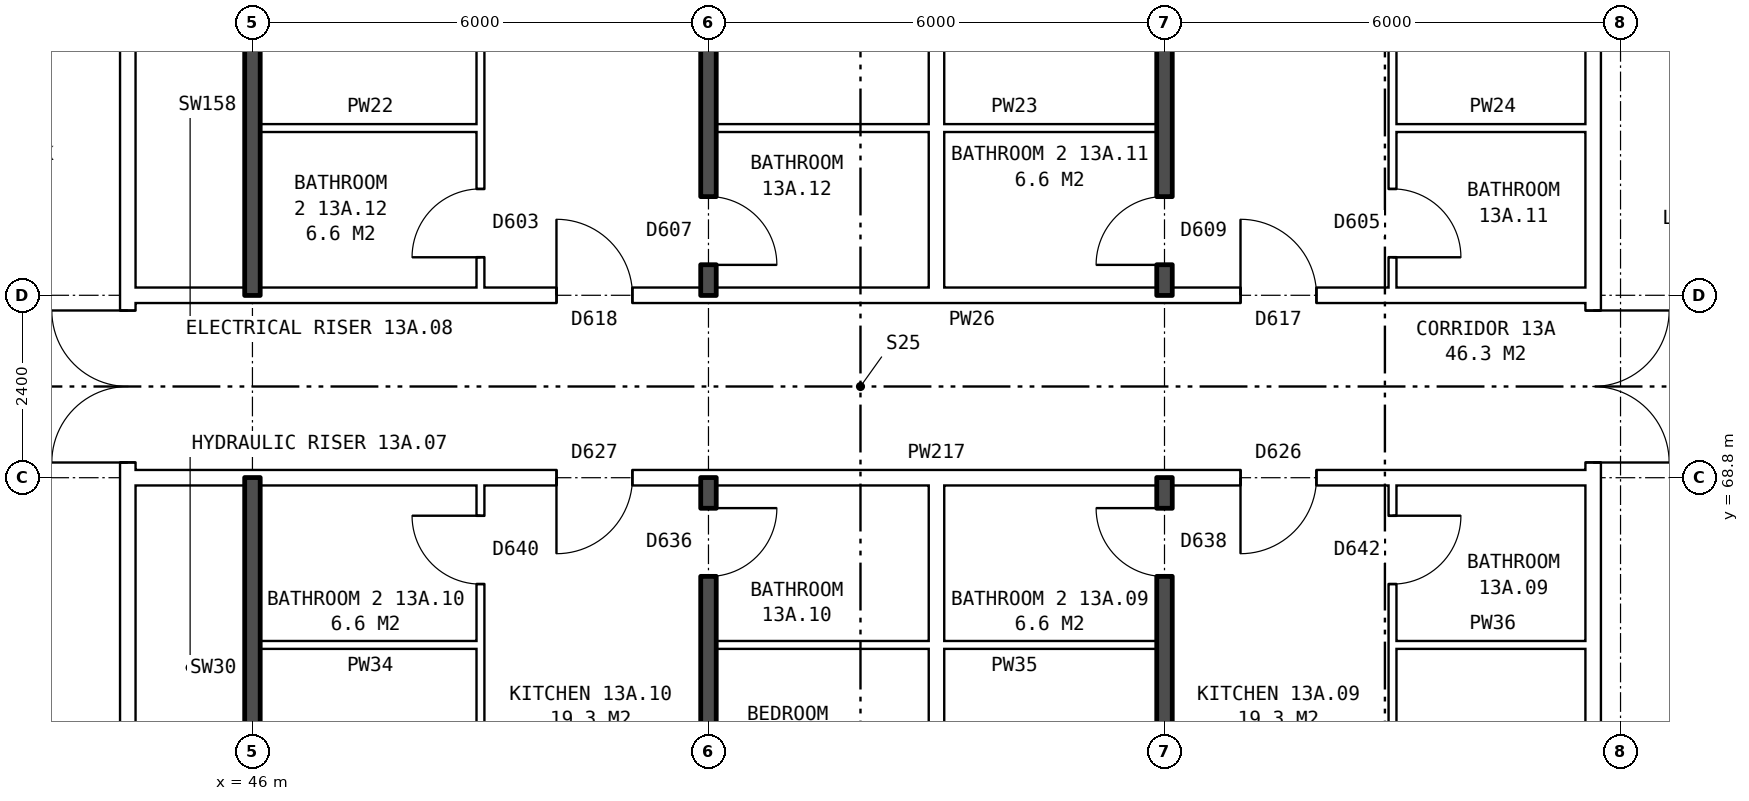
"""IFC4 building model, lengths in metres.
Left out: names, types, materials, properties, quantities, classifications, styles, units other than length and angle.
Written with IfcOpenShell. Run it as: python <this file> out.ifc"""

import sys

from ifc_helpers import new_model, si_unit, direction, frame, frame_2d, origin, place, context, subcontext, project, spatial, rectangle, extrude, element, fill, save


model = new_model("IFC4")
c1 = context("Model", 3, precision=1e-05, world=origin(), true_north=direction((0.0, 1.0)))
c2 = subcontext(c1, "Body", "Model", "MODEL_VIEW")
j1 = project(units=[si_unit("LENGTHUNIT", "METRE"), si_unit("PLANEANGLEUNIT", "RADIAN")], contexts=[c1])
p1 = place(None, origin())
s1 = spatial("IfcSite", under=j1, at=p1, CompositionType="ELEMENT")
p2 = place(p1, origin())
s2 = spatial("IfcBuilding", under=s1, at=p2, CompositionType="ELEMENT")
p3 = place(p2, frame((0.0, 0.0, 50.5)))
s3 = spatial("IfcBuildingStorey", under=s2, at=p3, CompositionType="ELEMENT", Elevation=50.5)
p4 = place(p3, frame((63.64, 63.9, 0.0), z_axis=(0.0, 0.0, 1.0), x_axis=(0.0, 1.0, 0.0)))
e1 = element("IfcWall", 1, at=p4, inside=s3, PredefinedType="PARTITIONING", context=c2, shape_type="SweptSolid", body=[
    extrude(rectangle(XDim=12.2, YDim=0.2, at=frame_2d((6.1, 0.0))), origin(), (0.0, 0.0, 1.0), 2.85),
])
p5 = place(p4, frame((5.1, 0.0, 0.0)))
e2 = element("IfcOpeningElement", 2, at=p5, cuts=e1, PredefinedType="OPENING", context=c2, shape_type="SweptSolid", body=[
    extrude(rectangle(XDim=2.0, YDim=2.1, at=frame_2d((1.0, 1.05))), frame((0.0, 0.11, 0.0), z_axis=(0.0, -1.0, 0.0), x_axis=(1.0, 0.0, 0.0)), (0.0, 0.0, 1.0), 0.22),
])
p6 = place(p3, frame((44.36, 63.9, 0.0), z_axis=(0.0, 0.0, 1.0), x_axis=(0.0, 1.0, 0.0)))
e3 = element("IfcWall", 3, at=p6, inside=s3, PredefinedType="PARTITIONING", context=c2, shape_type="SweptSolid", body=[
    extrude(rectangle(XDim=12.2, YDim=0.2, at=frame_2d((6.1, 0.0))), origin(), (0.0, 0.0, 1.0), 2.85),
])
p7 = place(p6, frame((5.1, 0.0, 0.0)))
e4 = element("IfcOpeningElement", 4, at=p7, cuts=e3, PredefinedType="OPENING", context=c2, shape_type="SweptSolid", body=[
    extrude(rectangle(XDim=2.0, YDim=2.1, at=frame_2d((1.0, 1.05))), frame((0.0, 0.11, 0.0), z_axis=(0.0, -1.0, 0.0), x_axis=(1.0, 0.0, 0.0)), (0.0, 0.0, 1.0), 0.22),
])
p8 = place(p3, frame((46.1, 66.6, 0.0), z_axis=(0.0, 0.0, 1.0), x_axis=(1.0, 0.0, 0.0)))
e5 = element("IfcWall", 5, at=p8, inside=s3, PredefinedType="PARTITIONING", context=c2, shape_type="SweptSolid", body=[
    extrude(rectangle(XDim=2.9, YDim=0.1, at=frame_2d((1.45, 0.0))), origin(), (0.0, 0.0, 1.0), 2.85),
])
p9 = place(p3, frame((52.1, 66.6, 0.0), z_axis=(0.0, 0.0, 1.0), x_axis=(1.0, 0.0, 0.0)))
e6 = element("IfcWall", 6, at=p9, inside=s3, PredefinedType="PARTITIONING", context=c2, shape_type="SweptSolid", body=[
    extrude(rectangle(XDim=5.8, YDim=0.1, at=frame_2d((2.9, 0.0))), origin(), (0.0, 0.0, 1.0), 2.85),
])
p10 = place(p3, frame((61.0, 66.6, 0.0), z_axis=(0.0, 0.0, 1.0), x_axis=(1.0, 0.0, 0.0)))
e7 = element("IfcWall", 7, at=p10, inside=s3, PredefinedType="PARTITIONING", context=c2, shape_type="SweptSolid", body=[
    extrude(rectangle(XDim=2.64, YDim=0.1, at=frame_2d((1.32, 0.0))), origin(), (0.0, 0.0, 1.0), 2.85),
])
p11 = place(p3, frame((44.36, 68.8, 0.0), z_axis=(0.0, 0.0, 1.0), x_axis=(1.0, 0.0, 0.0)))
e8 = element("IfcWall", 8, at=p11, inside=s3, PredefinedType="PARTITIONING", context=c2, shape_type="SweptSolid", body=[
    extrude(rectangle(XDim=19.28, YDim=0.2, at=frame_2d((9.64, 0.0))), origin(), (0.0, 0.0, 1.0), 2.85),
])
p12 = place(p11, frame((14.64, 0.0, 0.0)))
e9 = element("IfcOpeningElement", 9, at=p12, cuts=e8, PredefinedType="OPENING", context=c2, shape_type="SweptSolid", body=[
    extrude(rectangle(XDim=1.0, YDim=2.1, at=frame_2d((0.5, 1.05))), frame((0.0, 0.11, 0.0), z_axis=(0.0, -1.0, 0.0), x_axis=(1.0, 0.0, 0.0)), (0.0, 0.0, 1.0), 0.22),
])
p13 = place(p11, frame((5.64, 0.0, 0.0)))
e10 = element("IfcOpeningElement", 10, at=p13, cuts=e8, PredefinedType="OPENING", context=c2, shape_type="SweptSolid", body=[
    extrude(rectangle(XDim=1.0, YDim=2.1, at=frame_2d((0.5, 1.05))), frame((0.0, 0.11, 0.0), z_axis=(0.0, -1.0, 0.0), x_axis=(1.0, 0.0, 0.0)), (0.0, 0.0, 1.0), 0.22),
])
p14 = place(p3, frame((44.36, 71.2, 0.0), z_axis=(0.0, 0.0, 1.0), x_axis=(1.0, 0.0, 0.0)))
e11 = element("IfcWall", 11, at=p14, inside=s3, PredefinedType="PARTITIONING", context=c2, shape_type="SweptSolid", body=[
    extrude(rectangle(XDim=19.28, YDim=0.2, at=frame_2d((9.64, 0.0))), origin(), (0.0, 0.0, 1.0), 2.85),
])
p15 = place(p14, frame((14.64, 0.0, 0.0)))
e12 = element("IfcOpeningElement", 12, at=p15, cuts=e11, PredefinedType="OPENING", context=c2, shape_type="SweptSolid", body=[
    extrude(rectangle(XDim=1.0, YDim=2.1, at=frame_2d((0.5, 1.05))), frame((0.0, 0.11, 0.0), z_axis=(0.0, -1.0, 0.0), x_axis=(1.0, 0.0, 0.0)), (0.0, 0.0, 1.0), 0.22),
])
p16 = place(p14, frame((5.64, 0.0, 0.0)))
e13 = element("IfcOpeningElement", 13, at=p16, cuts=e11, PredefinedType="OPENING", context=c2, shape_type="SweptSolid", body=[
    extrude(rectangle(XDim=1.0, YDim=2.1, at=frame_2d((0.5, 1.05))), frame((0.0, 0.11, 0.0), z_axis=(0.0, -1.0, 0.0), x_axis=(1.0, 0.0, 0.0)), (0.0, 0.0, 1.0), 0.22),
])
p17 = place(p3, frame((46.1, 73.4, 0.0), z_axis=(0.0, 0.0, 1.0), x_axis=(1.0, 0.0, 0.0)))
e14 = element("IfcWall", 14, at=p17, inside=s3, PredefinedType="PARTITIONING", context=c2, shape_type="SweptSolid", body=[
    extrude(rectangle(XDim=2.9, YDim=0.1, at=frame_2d((1.45, 0.0))), origin(), (0.0, 0.0, 1.0), 2.85),
])
p18 = place(p3, frame((52.1, 73.4, 0.0), z_axis=(0.0, 0.0, 1.0), x_axis=(1.0, 0.0, 0.0)))
e15 = element("IfcWall", 15, at=p18, inside=s3, PredefinedType="PARTITIONING", context=c2, shape_type="SweptSolid", body=[
    extrude(rectangle(XDim=5.8, YDim=0.1, at=frame_2d((2.9, 0.0))), origin(), (0.0, 0.0, 1.0), 2.85),
])
p19 = place(p3, frame((61.0, 73.4, 0.0), z_axis=(0.0, 0.0, 1.0), x_axis=(1.0, 0.0, 0.0)))
e16 = element("IfcWall", 16, at=p19, inside=s3, PredefinedType="PARTITIONING", context=c2, shape_type="SweptSolid", body=[
    extrude(rectangle(XDim=2.64, YDim=0.1, at=frame_2d((1.32, 0.0))), origin(), (0.0, 0.0, 1.0), 2.85),
])
for number, where, z_axis, x_axis in (
    (17, (46.0, 63.8, 0.0), (0.0, 0.0, 1.0), (0.0, 1.0, 0.0)),
    (18, (46.0, 71.2, 0.0), (0.0, 0.0, 1.0), (0.0, 1.0, 0.0)),
):
    element("IfcWall", number, at=place(p3, frame(where, z_axis=z_axis, x_axis=x_axis)), inside=s3, PredefinedType="SOLIDWALL", context=c2, shape_type="SweptSolid", body=[
        extrude(rectangle(XDim=5.0, YDim=0.2, at=frame_2d((2.5, 0.0))), origin(), (0.0, 0.0, 1.0), 2.85),
    ])
p20 = place(p3, frame((49.0, 54.36, 0.0), z_axis=(0.0, 0.0, 1.0), x_axis=(0.0, 1.0, 0.0)))
e19 = element("IfcWall", 19, at=p20, inside=s3, PredefinedType="PARTITIONING", context=c2, shape_type="SweptSolid", body=[
    extrude(rectangle(XDim=14.34, YDim=0.1, at=frame_2d((7.17, 0.0))), origin(), (0.0, 0.0, 1.0), 2.85),
])
p21 = place(p20, frame((6.7, 0.0, 0.0)))
e20 = element("IfcOpeningElement", 20, at=p21, cuts=e19, PredefinedType="OPENING", context=c2, shape_type="SweptSolid", body=[
    extrude(rectangle(XDim=0.9, YDim=2.1, at=frame_2d((0.45, 1.05))), frame((0.0, 0.06, 0.0), z_axis=(0.0, -1.0, 0.0), x_axis=(1.0, 0.0, 0.0)), (0.0, 0.0, 1.0), 0.12),
])
p22 = place(p20, frame((13.04, 0.0, 0.0)))
e21 = element("IfcOpeningElement", 21, at=p22, cuts=e19, PredefinedType="OPENING", context=c2, shape_type="SweptSolid", body=[
    extrude(rectangle(XDim=0.9, YDim=2.1, at=frame_2d((0.45, 1.05))), frame((0.0, 0.06, 0.0), z_axis=(0.0, -1.0, 0.0), x_axis=(1.0, 0.0, 0.0)), (0.0, 0.0, 1.0), 0.12),
])
p23 = place(p3, frame((49.0, 71.3, 0.0), z_axis=(0.0, 0.0, 1.0), x_axis=(0.0, 1.0, 0.0)))
e22 = element("IfcWall", 22, at=p23, inside=s3, PredefinedType="PARTITIONING", context=c2, shape_type="SweptSolid", body=[
    extrude(rectangle(XDim=14.34, YDim=0.1, at=frame_2d((7.17, 0.0))), origin(), (0.0, 0.0, 1.0), 2.85),
])
p24 = place(p23, frame((6.74, 0.0, 0.0)))
e23 = element("IfcOpeningElement", 23, at=p24, cuts=e22, PredefinedType="OPENING", context=c2, shape_type="SweptSolid", body=[
    extrude(rectangle(XDim=0.9, YDim=2.1, at=frame_2d((0.45, 1.05))), frame((0.0, 0.06, 0.0), z_axis=(0.0, -1.0, 0.0), x_axis=(1.0, 0.0, 0.0)), (0.0, 0.0, 1.0), 0.12),
])
p25 = place(p23, frame((0.4, 0.0, 0.0)))
e24 = element("IfcOpeningElement", 24, at=p25, cuts=e22, PredefinedType="OPENING", context=c2, shape_type="SweptSolid", body=[
    extrude(rectangle(XDim=0.9, YDim=2.1, at=frame_2d((0.45, 1.05))), frame((0.0, 0.06, 0.0), z_axis=(0.0, -1.0, 0.0), x_axis=(1.0, 0.0, 0.0)), (0.0, 0.0, 1.0), 0.12),
])
p26 = place(p3, frame((52.0, 54.36, 0.0), z_axis=(0.0, 0.0, 1.0), x_axis=(0.0, 1.0, 0.0)))
e25 = element("IfcWall", 25, at=p26, inside=s3, PredefinedType="SOLIDWALL", context=c2, shape_type="SweptSolid", body=[
    extrude(rectangle(XDim=14.44, YDim=0.2, at=frame_2d((7.22, 0.0))), origin(), (0.0, 0.0, 1.0), 2.85),
])
p27 = place(p26, frame((6.7, 0.0, 0.0)))
e26 = element("IfcOpeningElement", 26, at=p27, cuts=e25, PredefinedType="OPENING", context=c2, shape_type="SweptSolid", body=[
    extrude(rectangle(XDim=0.9, YDim=2.1, at=frame_2d((0.45, 1.05))), frame((0.0, 0.11, 0.0), z_axis=(0.0, -1.0, 0.0), x_axis=(1.0, 0.0, 0.0)), (0.0, 0.0, 1.0), 0.22),
])
p28 = place(p26, frame((13.14, 0.0, 0.0)))
e27 = element("IfcOpeningElement", 27, at=p28, cuts=e25, PredefinedType="OPENING", context=c2, shape_type="SweptSolid", body=[
    extrude(rectangle(XDim=0.9, YDim=2.1, at=frame_2d((0.45, 1.05))), frame((0.0, 0.11, 0.0), z_axis=(0.0, -1.0, 0.0), x_axis=(1.0, 0.0, 0.0)), (0.0, 0.0, 1.0), 0.22),
])
p29 = place(p3, frame((52.0, 71.2, 0.0), z_axis=(0.0, 0.0, 1.0), x_axis=(0.0, 1.0, 0.0)))
e28 = element("IfcWall", 28, at=p29, inside=s3, PredefinedType="SOLIDWALL", context=c2, shape_type="SweptSolid", body=[
    extrude(rectangle(XDim=14.44, YDim=0.2, at=frame_2d((7.22, 0.0))), origin(), (0.0, 0.0, 1.0), 2.85),
])
p30 = place(p29, frame((6.84, 0.0, 0.0)))
e29 = element("IfcOpeningElement", 29, at=p30, cuts=e28, PredefinedType="OPENING", context=c2, shape_type="SweptSolid", body=[
    extrude(rectangle(XDim=0.9, YDim=2.1, at=frame_2d((0.45, 1.05))), frame((0.0, 0.11, 0.0), z_axis=(0.0, -1.0, 0.0), x_axis=(1.0, 0.0, 0.0)), (0.0, 0.0, 1.0), 0.22),
])
p31 = place(p29, frame((0.4, 0.0, 0.0)))
e30 = element("IfcOpeningElement", 30, at=p31, cuts=e28, PredefinedType="OPENING", context=c2, shape_type="SweptSolid", body=[
    extrude(rectangle(XDim=0.9, YDim=2.1, at=frame_2d((0.45, 1.05))), frame((0.0, 0.11, 0.0), z_axis=(0.0, -1.0, 0.0), x_axis=(1.0, 0.0, 0.0)), (0.0, 0.0, 1.0), 0.22),
])
for number, where, z_axis, x_axis in (
    (31, (55.0, 54.36, 0.0), (0.0, 0.0, 1.0), (0.0, 1.0, 0.0)),
    (32, (55.0, 71.3, 0.0), (0.0, 0.0, 1.0), (0.0, 1.0, 0.0)),
):
    element("IfcWall", number, at=place(p3, frame(where, z_axis=z_axis, x_axis=x_axis)), inside=s3, PredefinedType="PARTITIONING", context=c2, shape_type="SweptSolid", body=[
        extrude(rectangle(XDim=14.34, YDim=0.2, at=frame_2d((7.17, 0.0))), origin(), (0.0, 0.0, 1.0), 2.85),
    ])
p32 = place(p3, frame((58.0, 54.36, 0.0), z_axis=(0.0, 0.0, 1.0), x_axis=(0.0, 1.0, 0.0)))
e33 = element("IfcWall", 33, at=p32, inside=s3, PredefinedType="SOLIDWALL", context=c2, shape_type="SweptSolid", body=[
    extrude(rectangle(XDim=14.44, YDim=0.2, at=frame_2d((7.22, 0.0))), origin(), (0.0, 0.0, 1.0), 2.85),
])
p33 = place(p32, frame((6.7, 0.0, 0.0)))
e34 = element("IfcOpeningElement", 34, at=p33, cuts=e33, PredefinedType="OPENING", context=c2, shape_type="SweptSolid", body=[
    extrude(rectangle(XDim=0.9, YDim=2.1, at=frame_2d((0.45, 1.05))), frame((0.0, 0.11, 0.0), z_axis=(0.0, -1.0, 0.0), x_axis=(1.0, 0.0, 0.0)), (0.0, 0.0, 1.0), 0.22),
])
p34 = place(p32, frame((13.14, 0.0, 0.0)))
e35 = element("IfcOpeningElement", 35, at=p34, cuts=e33, PredefinedType="OPENING", context=c2, shape_type="SweptSolid", body=[
    extrude(rectangle(XDim=0.9, YDim=2.1, at=frame_2d((0.45, 1.05))), frame((0.0, 0.11, 0.0), z_axis=(0.0, -1.0, 0.0), x_axis=(1.0, 0.0, 0.0)), (0.0, 0.0, 1.0), 0.22),
])
p35 = place(p3, frame((58.0, 71.2, 0.0), z_axis=(0.0, 0.0, 1.0), x_axis=(0.0, 1.0, 0.0)))
e36 = element("IfcWall", 36, at=p35, inside=s3, PredefinedType="SOLIDWALL", context=c2, shape_type="SweptSolid", body=[
    extrude(rectangle(XDim=14.44, YDim=0.2, at=frame_2d((7.22, 0.0))), origin(), (0.0, 0.0, 1.0), 2.85),
])
p36 = place(p35, frame((8.04, 0.0, 0.0)))
e37 = element("IfcOpeningElement", 37, at=p36, cuts=e36, PredefinedType="OPENING", context=c2, shape_type="SweptSolid", body=[
    extrude(rectangle(XDim=0.9, YDim=2.1, at=frame_2d((0.45, 1.05))), frame((0.0, 0.11, 0.0), z_axis=(0.0, -1.0, 0.0), x_axis=(1.0, 0.0, 0.0)), (0.0, 0.0, 1.0), 0.22),
])
p37 = place(p35, frame((0.4, 0.0, 0.0)))
e38 = element("IfcOpeningElement", 38, at=p37, cuts=e36, PredefinedType="OPENING", context=c2, shape_type="SweptSolid", body=[
    extrude(rectangle(XDim=0.9, YDim=2.1, at=frame_2d((0.45, 1.05))), frame((0.0, 0.11, 0.0), z_axis=(0.0, -1.0, 0.0), x_axis=(1.0, 0.0, 0.0)), (0.0, 0.0, 1.0), 0.22),
])
p38 = place(p3, frame((61.0, 54.36, 0.0), z_axis=(0.0, 0.0, 1.0), x_axis=(0.0, 1.0, 0.0)))
e39 = element("IfcWall", 39, at=p38, inside=s3, PredefinedType="PARTITIONING", context=c2, shape_type="SweptSolid", body=[
    extrude(rectangle(XDim=14.34, YDim=0.1, at=frame_2d((7.17, 0.0))), origin(), (0.0, 0.0, 1.0), 2.85),
])
p39 = place(p38, frame((6.7, 0.0, 0.0)))
e40 = element("IfcOpeningElement", 40, at=p39, cuts=e39, PredefinedType="OPENING", context=c2, shape_type="SweptSolid", body=[
    extrude(rectangle(XDim=0.9, YDim=2.1, at=frame_2d((0.45, 1.05))), frame((0.0, 0.06, 0.0), z_axis=(0.0, -1.0, 0.0), x_axis=(1.0, 0.0, 0.0)), (0.0, 0.0, 1.0), 0.12),
])
p40 = place(p38, frame((13.04, 0.0, 0.0)))
e41 = element("IfcOpeningElement", 41, at=p40, cuts=e39, PredefinedType="OPENING", context=c2, shape_type="SweptSolid", body=[
    extrude(rectangle(XDim=0.9, YDim=2.1, at=frame_2d((0.45, 1.05))), frame((0.0, 0.06, 0.0), z_axis=(0.0, -1.0, 0.0), x_axis=(1.0, 0.0, 0.0)), (0.0, 0.0, 1.0), 0.12),
])
p41 = place(p3, frame((61.0, 71.3, 0.0), z_axis=(0.0, 0.0, 1.0), x_axis=(0.0, 1.0, 0.0)))
e42 = element("IfcWall", 42, at=p41, inside=s3, PredefinedType="PARTITIONING", context=c2, shape_type="SweptSolid", body=[
    extrude(rectangle(XDim=14.34, YDim=0.1, at=frame_2d((7.17, 0.0))), origin(), (0.0, 0.0, 1.0), 2.85),
])
p42 = place(p41, frame((7.94, 0.0, 0.0)))
e43 = element("IfcOpeningElement", 43, at=p42, cuts=e42, PredefinedType="OPENING", context=c2, shape_type="SweptSolid", body=[
    extrude(rectangle(XDim=0.9, YDim=2.1, at=frame_2d((0.45, 1.05))), frame((0.0, 0.06, 0.0), z_axis=(0.0, -1.0, 0.0), x_axis=(1.0, 0.0, 0.0)), (0.0, 0.0, 1.0), 0.12),
])
p43 = place(p41, frame((0.4, 0.0, 0.0)))
e44 = element("IfcOpeningElement", 44, at=p43, cuts=e42, PredefinedType="OPENING", context=c2, shape_type="SweptSolid", body=[
    extrude(rectangle(XDim=0.9, YDim=2.1, at=frame_2d((0.45, 1.05))), frame((0.0, 0.06, 0.0), z_axis=(0.0, -1.0, 0.0), x_axis=(1.0, 0.0, 0.0)), (0.0, 0.0, 1.0), 0.12),
])
p44 = place(p5, frame((2.0, 0.0, 0.0), z_axis=(0.0, 0.0, 1.0), x_axis=(-1.0, 0.0, 0.0)))
e45 = element("IfcDoor", 45, at=p44, inside=s3, OperationType="DOUBLE_DOOR_SINGLE_SWING", PredefinedType="DOOR", context=c2, shape_type="SweptSolid", body=[
    extrude(rectangle(XDim=2.0, YDim=2.1, at=frame_2d((1.0, 1.05))), frame((0.0, 0.025, 0.0), z_axis=(0.0, -1.0, 0.0), x_axis=(1.0, 0.0, 0.0)), (0.0, 0.0, 1.0), 0.05),
])
fill(e2, e45)
p45 = place(p7, origin())
e46 = element("IfcDoor", 46, at=p45, inside=s3, OperationType="DOUBLE_DOOR_SINGLE_SWING", PredefinedType="DOOR", context=c2, shape_type="SweptSolid", body=[
    extrude(rectangle(XDim=2.0, YDim=2.1, at=frame_2d((1.0, 1.05))), frame((0.0, 0.025, 0.0), z_axis=(0.0, -1.0, 0.0), x_axis=(1.0, 0.0, 0.0)), (0.0, 0.0, 1.0), 0.05),
])
fill(e4, e46)
p46 = place(p12, frame((1.0, 0.0, 0.0), z_axis=(0.0, 0.0, 1.0), x_axis=(-1.0, 0.0, 0.0)))
e47 = element("IfcDoor", 47, at=p46, inside=s3, OperationType="SINGLE_SWING_RIGHT", PredefinedType="DOOR", context=c2, shape_type="SweptSolid", body=[
    extrude(rectangle(XDim=1.0, YDim=2.1, at=frame_2d((0.5, 1.05))), frame((0.0, 0.025, 0.0), z_axis=(0.0, -1.0, 0.0), x_axis=(1.0, 0.0, 0.0)), (0.0, 0.0, 1.0), 0.05),
])
fill(e9, e47)
p47 = place(p40, frame((0.9, 0.0, 0.0), z_axis=(0.0, 0.0, 1.0), x_axis=(-1.0, 0.0, 0.0)))
e48 = element("IfcDoor", 48, at=p47, inside=s3, OperationType="SINGLE_SWING_LEFT", PredefinedType="DOOR", context=c2, shape_type="SweptSolid", body=[
    extrude(rectangle(XDim=0.9, YDim=2.1, at=frame_2d((0.45, 1.05))), frame((0.0, 0.025, 0.0), z_axis=(0.0, -1.0, 0.0), x_axis=(1.0, 0.0, 0.0)), (0.0, 0.0, 1.0), 0.05),
])
fill(e41, e48)
p48 = place(p34, origin())
e49 = element("IfcDoor", 49, at=p48, inside=s3, OperationType="SINGLE_SWING_RIGHT", PredefinedType="DOOR", context=c2, shape_type="SweptSolid", body=[
    extrude(rectangle(XDim=0.9, YDim=2.1, at=frame_2d((0.45, 1.05))), frame((0.0, 0.025, 0.0), z_axis=(0.0, -1.0, 0.0), x_axis=(1.0, 0.0, 0.0)), (0.0, 0.0, 1.0), 0.05),
])
fill(e35, e49)
p49 = place(p13, frame((1.0, 0.0, 0.0), z_axis=(0.0, 0.0, 1.0), x_axis=(-1.0, 0.0, 0.0)))
e50 = element("IfcDoor", 50, at=p49, inside=s3, OperationType="SINGLE_SWING_RIGHT", PredefinedType="DOOR", context=c2, shape_type="SweptSolid", body=[
    extrude(rectangle(XDim=1.0, YDim=2.1, at=frame_2d((0.5, 1.05))), frame((0.0, 0.025, 0.0), z_axis=(0.0, -1.0, 0.0), x_axis=(1.0, 0.0, 0.0)), (0.0, 0.0, 1.0), 0.05),
])
fill(e10, e50)
p50 = place(p28, frame((0.9, 0.0, 0.0), z_axis=(0.0, 0.0, 1.0), x_axis=(-1.0, 0.0, 0.0)))
e51 = element("IfcDoor", 51, at=p50, inside=s3, OperationType="SINGLE_SWING_LEFT", PredefinedType="DOOR", context=c2, shape_type="SweptSolid", body=[
    extrude(rectangle(XDim=0.9, YDim=2.1, at=frame_2d((0.45, 1.05))), frame((0.0, 0.025, 0.0), z_axis=(0.0, -1.0, 0.0), x_axis=(1.0, 0.0, 0.0)), (0.0, 0.0, 1.0), 0.05),
])
fill(e27, e51)
p51 = place(p22, origin())
e52 = element("IfcDoor", 52, at=p51, inside=s3, OperationType="SINGLE_SWING_RIGHT", PredefinedType="DOOR", context=c2, shape_type="SweptSolid", body=[
    extrude(rectangle(XDim=0.9, YDim=2.1, at=frame_2d((0.45, 1.05))), frame((0.0, 0.025, 0.0), z_axis=(0.0, -1.0, 0.0), x_axis=(1.0, 0.0, 0.0)), (0.0, 0.0, 1.0), 0.05),
])
fill(e21, e52)
p52 = place(p15, origin())
e53 = element("IfcDoor", 53, at=p52, inside=s3, OperationType="SINGLE_SWING_LEFT", PredefinedType="DOOR", context=c2, shape_type="SweptSolid", body=[
    extrude(rectangle(XDim=1.0, YDim=2.1, at=frame_2d((0.5, 1.05))), frame((0.0, 0.025, 0.0), z_axis=(0.0, -1.0, 0.0), x_axis=(1.0, 0.0, 0.0)), (0.0, 0.0, 1.0), 0.05),
])
fill(e12, e53)
p53 = place(p43, frame((0.9, 0.0, 0.0), z_axis=(0.0, 0.0, 1.0), x_axis=(-1.0, 0.0, 0.0)))
e54 = element("IfcDoor", 54, at=p53, inside=s3, OperationType="SINGLE_SWING_RIGHT", PredefinedType="DOOR", context=c2, shape_type="SweptSolid", body=[
    extrude(rectangle(XDim=0.9, YDim=2.1, at=frame_2d((0.45, 1.05))), frame((0.0, 0.025, 0.0), z_axis=(0.0, -1.0, 0.0), x_axis=(1.0, 0.0, 0.0)), (0.0, 0.0, 1.0), 0.05),
])
fill(e44, e54)
p54 = place(p37, origin())
e55 = element("IfcDoor", 55, at=p54, inside=s3, OperationType="SINGLE_SWING_LEFT", PredefinedType="DOOR", context=c2, shape_type="SweptSolid", body=[
    extrude(rectangle(XDim=0.9, YDim=2.1, at=frame_2d((0.45, 1.05))), frame((0.0, 0.025, 0.0), z_axis=(0.0, -1.0, 0.0), x_axis=(1.0, 0.0, 0.0)), (0.0, 0.0, 1.0), 0.05),
])
fill(e38, e55)
p55 = place(p16, origin())
e56 = element("IfcDoor", 56, at=p55, inside=s3, OperationType="SINGLE_SWING_LEFT", PredefinedType="DOOR", context=c2, shape_type="SweptSolid", body=[
    extrude(rectangle(XDim=1.0, YDim=2.1, at=frame_2d((0.5, 1.05))), frame((0.0, 0.025, 0.0), z_axis=(0.0, -1.0, 0.0), x_axis=(1.0, 0.0, 0.0)), (0.0, 0.0, 1.0), 0.05),
])
fill(e13, e56)
p56 = place(p31, frame((0.9, 0.0, 0.0), z_axis=(0.0, 0.0, 1.0), x_axis=(-1.0, 0.0, 0.0)))
e57 = element("IfcDoor", 57, at=p56, inside=s3, OperationType="SINGLE_SWING_RIGHT", PredefinedType="DOOR", context=c2, shape_type="SweptSolid", body=[
    extrude(rectangle(XDim=0.9, YDim=2.1, at=frame_2d((0.45, 1.05))), frame((0.0, 0.025, 0.0), z_axis=(0.0, -1.0, 0.0), x_axis=(1.0, 0.0, 0.0)), (0.0, 0.0, 1.0), 0.05),
])
fill(e30, e57)
p57 = place(p25, origin())
e58 = element("IfcDoor", 58, at=p57, inside=s3, OperationType="SINGLE_SWING_LEFT", PredefinedType="DOOR", context=c2, shape_type="SweptSolid", body=[
    extrude(rectangle(XDim=0.9, YDim=2.1, at=frame_2d((0.45, 1.05))), frame((0.0, 0.025, 0.0), z_axis=(0.0, -1.0, 0.0), x_axis=(1.0, 0.0, 0.0)), (0.0, 0.0, 1.0), 0.05),
])
fill(e24, e58)
save(model, sys.argv[1])
